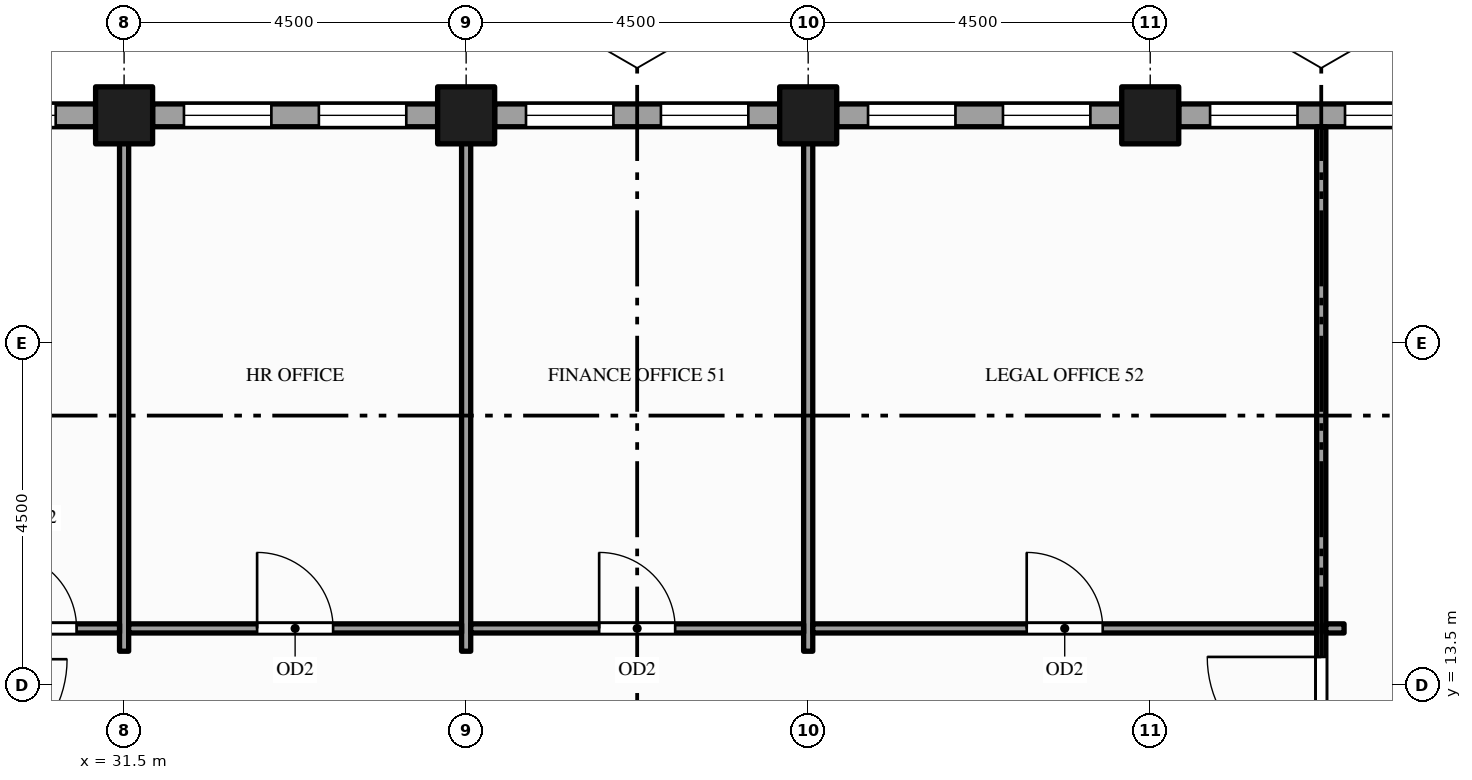
"""IFC4 building model, lengths in metres.
Left out: names, types, materials, properties, quantities, classifications, styles, units other than length and angle.
Written with IfcOpenShell. Run it as: python <this file> out.ifc"""

import sys

from ifc_helpers import new_model, si_unit, direction, frame, frame_2d, origin, origin_2d, place, context, subcontext, project, spatial, rectangle, hollow_rectangle, extrude, element, fill, save


model = new_model("IFC4")
c1 = context("Model", 3, precision=1e-05, world=origin(), true_north=direction((0.0, 1.0)))
c2 = subcontext(c1, "Body", "Model", "MODEL_VIEW")
j1 = project(units=[si_unit("LENGTHUNIT", "METRE"), si_unit("PLANEANGLEUNIT", "RADIAN")], contexts=[c1])
p1 = place(None, origin())
s1 = spatial("IfcSite", under=j1, at=p1, CompositionType="ELEMENT")
p2 = place(p1, origin())
s2 = spatial("IfcBuilding", under=s1, at=p2, CompositionType="ELEMENT")
p3 = place(p2, frame((0.0, 0.0, 211.0)))
s3 = spatial("IfcBuildingStorey", under=s2, at=p3, CompositionType="ELEMENT", Elevation=211.0)
for number, where, z_axis, x_axis in (
    (1, (31.5, 21.0, -0.15), (0.0, 0.0, 1.0), (1.0, 0.0, 0.0)),
    (2, (36.0, 21.0, -0.15), (0.0, 0.0, 1.0), (1.0, 0.0, 0.0)),
    (3, (40.5, 21.0, -0.15), (0.0, 0.0, 1.0), (1.0, 0.0, 0.0)),
    (4, (45.0, 21.0, -0.15), (0.0, 0.0, 1.0), (1.0, 0.0, 0.0)),
):
    element("IfcColumn", number, at=place(p3, frame(where, z_axis=z_axis, x_axis=x_axis)), inside=s3, PredefinedType="COLUMN", context=c2, shape_type="SweptSolid", body=[
        extrude(hollow_rectangle(XDim=0.75, YDim=0.75, WallThickness=0.036, at=origin_2d()), origin(), (0.0, 0.0, 1.0), 4.0),
    ])
p4 = place(p3, frame((49.125, 21.0, 0.0), z_axis=(0.0, 0.0, 1.0), x_axis=(-1.0, 0.0, 0.0)))
e5 = element("IfcWall", 5, at=p4, inside=s3, PredefinedType="STANDARD", context=c2, shape_type="SweptSolid", body=[
    extrude(rectangle(XDim=3.75, YDim=0.3, at=frame_2d((1.875, 0.0))), origin(), (0.0, 0.0, 1.0), 2.87),
])
p5 = place(p4, frame((0.413, 0.0, 0.9)))
e6 = element("IfcOpeningElement", 6, at=p5, cuts=e5, PredefinedType="OPENING", context=c2, shape_type="SweptSolid", body=[
    extrude(rectangle(XDim=1.15, YDim=1.75, at=frame_2d((0.575, 0.875))), frame((0.0, 0.16, 0.0), z_axis=(0.0, -1.0, 0.0), x_axis=(1.0, 0.0, 0.0)), (0.0, 0.0, 1.0), 0.32),
])
p6 = place(p4, frame((2.188, 0.0, 0.9)))
e7 = element("IfcOpeningElement", 7, at=p6, cuts=e5, PredefinedType="OPENING", context=c2, shape_type="SweptSolid", body=[
    extrude(rectangle(XDim=1.15, YDim=1.75, at=frame_2d((0.575, 0.875))), frame((0.0, 0.16, 0.0), z_axis=(0.0, -1.0, 0.0), x_axis=(1.0, 0.0, 0.0)), (0.0, 0.0, 1.0), 0.32),
])
p7 = place(p3, frame((44.625, 21.0, 0.0), z_axis=(0.0, 0.0, 1.0), x_axis=(-1.0, 0.0, 0.0)))
e8 = element("IfcWall", 8, at=p7, inside=s3, PredefinedType="STANDARD", context=c2, shape_type="SweptSolid", body=[
    extrude(rectangle(XDim=3.75, YDim=0.3, at=frame_2d((1.875, 0.0))), origin(), (0.0, 0.0, 1.0), 2.87),
])
p8 = place(p7, frame((0.413, 0.0, 0.9)))
e9 = element("IfcOpeningElement", 9, at=p8, cuts=e8, PredefinedType="OPENING", context=c2, shape_type="SweptSolid", body=[
    extrude(rectangle(XDim=1.15, YDim=1.75, at=frame_2d((0.575, 0.875))), frame((0.0, 0.16, 0.0), z_axis=(0.0, -1.0, 0.0), x_axis=(1.0, 0.0, 0.0)), (0.0, 0.0, 1.0), 0.32),
])
p9 = place(p7, frame((2.188, 0.0, 0.9)))
e10 = element("IfcOpeningElement", 10, at=p9, cuts=e8, PredefinedType="OPENING", context=c2, shape_type="SweptSolid", body=[
    extrude(rectangle(XDim=1.15, YDim=1.75, at=frame_2d((0.575, 0.875))), frame((0.0, 0.16, 0.0), z_axis=(0.0, -1.0, 0.0), x_axis=(1.0, 0.0, 0.0)), (0.0, 0.0, 1.0), 0.32),
])
p10 = place(p3, frame((40.125, 21.0, 0.0), z_axis=(0.0, 0.0, 1.0), x_axis=(-1.0, 0.0, 0.0)))
e11 = element("IfcWall", 11, at=p10, inside=s3, PredefinedType="STANDARD", context=c2, shape_type="SweptSolid", body=[
    extrude(rectangle(XDim=3.75, YDim=0.3, at=frame_2d((1.875, 0.0))), origin(), (0.0, 0.0, 1.0), 2.87),
])
p11 = place(p10, frame((0.413, 0.0, 0.9)))
e12 = element("IfcOpeningElement", 12, at=p11, cuts=e11, PredefinedType="OPENING", context=c2, shape_type="SweptSolid", body=[
    extrude(rectangle(XDim=1.15, YDim=1.75, at=frame_2d((0.575, 0.875))), frame((0.0, 0.16, 0.0), z_axis=(0.0, -1.0, 0.0), x_axis=(1.0, 0.0, 0.0)), (0.0, 0.0, 1.0), 0.32),
])
p12 = place(p10, frame((2.188, 0.0, 0.9)))
e13 = element("IfcOpeningElement", 13, at=p12, cuts=e11, PredefinedType="OPENING", context=c2, shape_type="SweptSolid", body=[
    extrude(rectangle(XDim=1.15, YDim=1.75, at=frame_2d((0.575, 0.875))), frame((0.0, 0.16, 0.0), z_axis=(0.0, -1.0, 0.0), x_axis=(1.0, 0.0, 0.0)), (0.0, 0.0, 1.0), 0.32),
])
p13 = place(p3, frame((35.625, 21.0, 0.0), z_axis=(0.0, 0.0, 1.0), x_axis=(-1.0, 0.0, 0.0)))
e14 = element("IfcWall", 14, at=p13, inside=s3, PredefinedType="STANDARD", context=c2, shape_type="SweptSolid", body=[
    extrude(rectangle(XDim=3.75, YDim=0.3, at=frame_2d((1.875, 0.0))), origin(), (0.0, 0.0, 1.0), 2.87),
])
p14 = place(p13, frame((0.413, 0.0, 0.9)))
e15 = element("IfcOpeningElement", 15, at=p14, cuts=e14, PredefinedType="OPENING", context=c2, shape_type="SweptSolid", body=[
    extrude(rectangle(XDim=1.15, YDim=1.75, at=frame_2d((0.575, 0.875))), frame((0.0, 0.16, 0.0), z_axis=(0.0, -1.0, 0.0), x_axis=(1.0, 0.0, 0.0)), (0.0, 0.0, 1.0), 0.32),
])
p15 = place(p13, frame((2.188, 0.0, 0.9)))
e16 = element("IfcOpeningElement", 16, at=p15, cuts=e14, PredefinedType="OPENING", context=c2, shape_type="SweptSolid", body=[
    extrude(rectangle(XDim=1.15, YDim=1.75, at=frame_2d((0.575, 0.875))), frame((0.0, 0.16, 0.0), z_axis=(0.0, -1.0, 0.0), x_axis=(1.0, 0.0, 0.0)), (0.0, 0.0, 1.0), 0.32),
])
p16 = place(p3, frame((31.125, 21.0, 0.0), z_axis=(0.0, 0.0, 1.0), x_axis=(-1.0, 0.0, 0.0)))
e17 = element("IfcWall", 17, at=p16, inside=s3, PredefinedType="STANDARD", context=c2, shape_type="SweptSolid", body=[
    extrude(rectangle(XDim=2.25, YDim=0.3, at=frame_2d((1.125, 0.0))), origin(), (0.0, 0.0, 1.0), 2.87),
])
p17 = place(p16, frame((0.525, 0.0, 0.9)))
e18 = element("IfcOpeningElement", 18, at=p17, cuts=e17, PredefinedType="OPENING", context=c2, shape_type="SweptSolid", body=[
    extrude(rectangle(XDim=1.2, YDim=1.75, at=frame_2d((0.6, 0.875))), frame((0.0, 0.16, 0.0), z_axis=(0.0, -1.0, 0.0), x_axis=(1.0, 0.0, 0.0)), (0.0, 0.0, 1.0), 0.32),
])
for number, where, z_axis, x_axis in (
    (19, (31.5, 13.95, 0.0), (0.0, 0.0, 1.0), (0.0, 1.0, 0.0)),
    (20, (36.0, 13.95, 0.0), (0.0, 0.0, 1.0), (0.0, 1.0, 0.0)),
    (21, (40.5, 13.95, 0.0), (0.0, 0.0, 1.0), (0.0, 1.0, 0.0)),
):
    element("IfcWall", number, at=place(p3, frame(where, z_axis=z_axis, x_axis=x_axis)), inside=s3, PredefinedType="PARTITIONING", context=c2, shape_type="SweptSolid", body=[
        extrude(rectangle(XDim=6.9, YDim=0.12, at=frame_2d((3.45, 0.0))), origin(), (0.0, 0.0, 1.0), 2.87),
    ])
p18 = place(p3, frame((47.25, -1.35, 0.0), z_axis=(0.0, 0.0, 1.0), x_axis=(0.0, 1.0, 0.0)))
e22 = element("IfcWall", 22, at=p18, inside=s3, PredefinedType="PARTITIONING", context=c2, shape_type="SweptSolid", body=[
    extrude(rectangle(XDim=22.2, YDim=0.12, at=frame_2d((11.1, 0.0))), origin(), (0.0, 0.0, 1.0), 2.87),
])
p19 = place(p18, frame((6.975, 0.0, 0.0)))
e23 = element("IfcOpeningElement", 23, at=p19, cuts=e22, PredefinedType="OPENING", context=c2, shape_type="SweptSolid", body=[
    extrude(rectangle(XDim=1.5, YDim=2.1, at=frame_2d((0.75, 1.05))), frame((0.0, 0.07, 0.0), z_axis=(0.0, -1.0, 0.0), x_axis=(1.0, 0.0, 0.0)), (0.0, 0.0, 1.0), 0.14),
])
p20 = place(p18, frame((13.725, 0.0, 0.0)))
e24 = element("IfcOpeningElement", 24, at=p20, cuts=e22, PredefinedType="OPENING", context=c2, shape_type="SweptSolid", body=[
    extrude(rectangle(XDim=1.5, YDim=2.1, at=frame_2d((0.75, 1.05))), frame((0.0, 0.07, 0.0), z_axis=(0.0, -1.0, 0.0), x_axis=(1.0, 0.0, 0.0)), (0.0, 0.0, 1.0), 0.14),
])
p21 = place(p18, frame((9.29, 0.0, 0.0)))
e25 = element("IfcOpeningElement", 25, at=p21, cuts=e22, PredefinedType="OPENING", context=c2, shape_type="SweptSolid", body=[
    extrude(rectangle(XDim=0.9, YDim=2.1, at=frame_2d((0.45, 1.05))), frame((0.0, 0.07, 0.0), z_axis=(0.0, -1.0, 0.0), x_axis=(1.0, 0.0, 0.0)), (0.0, 0.0, 1.0), 0.14),
])
p22 = place(p18, frame((10.65, 0.0, 0.0)))
e26 = element("IfcOpeningElement", 26, at=p22, cuts=e22, PredefinedType="OPENING", context=c2, shape_type="SweptSolid", body=[
    extrude(rectangle(XDim=0.9, YDim=2.1, at=frame_2d((0.45, 1.05))), frame((0.0, 0.07, 0.0), z_axis=(0.0, -1.0, 0.0), x_axis=(1.0, 0.0, 0.0)), (0.0, 0.0, 1.0), 0.14),
])
p23 = place(p18, frame((12.01, 0.0, 0.0)))
e27 = element("IfcOpeningElement", 27, at=p23, cuts=e22, PredefinedType="OPENING", context=c2, shape_type="SweptSolid", body=[
    extrude(rectangle(XDim=1.0, YDim=2.1, at=frame_2d((0.5, 1.05))), frame((0.0, 0.07, 0.0), z_axis=(0.0, -1.0, 0.0), x_axis=(1.0, 0.0, 0.0)), (0.0, 0.0, 1.0), 0.14),
])
p24 = place(p3, frame((29.31, 14.25, 0.0), z_axis=(0.0, 0.0, 1.0), x_axis=(1.0, 0.0, 0.0)))
e28 = element("IfcWall", 28, at=p24, inside=s3, PredefinedType="PARTITIONING", context=c2, shape_type="SweptSolid", body=[
    extrude(rectangle(XDim=2.13, YDim=0.12, at=frame_2d((1.065, 0.0))), origin(), (0.0, 0.0, 1.0), 2.87),
])
p25 = place(p24, frame((0.565, 0.0, 0.0)))
e29 = element("IfcOpeningElement", 29, at=p25, cuts=e28, PredefinedType="OPENING", context=c2, shape_type="SweptSolid", body=[
    extrude(rectangle(XDim=1.0, YDim=2.1, at=frame_2d((0.5, 1.05))), frame((0.0, 0.07, 0.0), z_axis=(0.0, -1.0, 0.0), x_axis=(1.0, 0.0, 0.0)), (0.0, 0.0, 1.0), 0.14),
])
p26 = place(p3, frame((31.56, 14.25, 0.0), z_axis=(0.0, 0.0, 1.0), x_axis=(1.0, 0.0, 0.0)))
e30 = element("IfcWall", 30, at=p26, inside=s3, PredefinedType="PARTITIONING", context=c2, shape_type="SweptSolid", body=[
    extrude(rectangle(XDim=4.38, YDim=0.12, at=frame_2d((2.19, 0.0))), origin(), (0.0, 0.0, 1.0), 2.87),
])
p27 = place(p26, frame((1.69, 0.0, 0.0)))
e31 = element("IfcOpeningElement", 31, at=p27, cuts=e30, PredefinedType="OPENING", context=c2, shape_type="SweptSolid", body=[
    extrude(rectangle(XDim=1.0, YDim=2.1, at=frame_2d((0.5, 1.05))), frame((0.0, 0.07, 0.0), z_axis=(0.0, -1.0, 0.0), x_axis=(1.0, 0.0, 0.0)), (0.0, 0.0, 1.0), 0.14),
])
p28 = place(p3, frame((36.06, 14.25, 0.0), z_axis=(0.0, 0.0, 1.0), x_axis=(1.0, 0.0, 0.0)))
e32 = element("IfcWall", 32, at=p28, inside=s3, PredefinedType="PARTITIONING", context=c2, shape_type="SweptSolid", body=[
    extrude(rectangle(XDim=4.38, YDim=0.12, at=frame_2d((2.19, 0.0))), origin(), (0.0, 0.0, 1.0), 2.87),
])
p29 = place(p28, frame((1.69, 0.0, 0.0)))
e33 = element("IfcOpeningElement", 33, at=p29, cuts=e32, PredefinedType="OPENING", context=c2, shape_type="SweptSolid", body=[
    extrude(rectangle(XDim=1.0, YDim=2.1, at=frame_2d((0.5, 1.05))), frame((0.0, 0.07, 0.0), z_axis=(0.0, -1.0, 0.0), x_axis=(1.0, 0.0, 0.0)), (0.0, 0.0, 1.0), 0.14),
])
p30 = place(p3, frame((40.56, 14.25, 0.0), z_axis=(0.0, 0.0, 1.0), x_axis=(1.0, 0.0, 0.0)))
e34 = element("IfcWall", 34, at=p30, inside=s3, PredefinedType="PARTITIONING", context=c2, shape_type="SweptSolid", body=[
    extrude(rectangle(XDim=6.63, YDim=0.12, at=frame_2d((3.315, 0.0))), origin(), (0.0, 0.0, 1.0), 2.87),
])
p31 = place(p30, frame((2.815, 0.0, 0.0)))
e35 = element("IfcOpeningElement", 35, at=p31, cuts=e34, PredefinedType="OPENING", context=c2, shape_type="SweptSolid", body=[
    extrude(rectangle(XDim=1.0, YDim=2.1, at=frame_2d((0.5, 1.05))), frame((0.0, 0.07, 0.0), z_axis=(0.0, -1.0, 0.0), x_axis=(1.0, 0.0, 0.0)), (0.0, 0.0, 1.0), 0.14),
])
p32 = place(p3, frame((47.31, 14.25, 0.0), z_axis=(0.0, 0.0, 1.0), x_axis=(1.0, 0.0, 0.0)))
e36 = element("IfcWall", 36, at=p32, inside=s3, PredefinedType="PARTITIONING", context=c2, shape_type="SweptSolid", body=[
    extrude(rectangle(XDim=0.24, YDim=0.12, at=frame_2d((0.12, 0.0))), origin(), (0.0, 0.0, 1.0), 2.87),
])
p33 = place(p5, origin())
e37 = element("IfcWindow", 37, at=p33, inside=s3, PartitioningType="SINGLE_PANEL", PredefinedType="WINDOW", context=c2, shape_type="SweptSolid", body=[
    extrude(rectangle(XDim=1.15, YDim=1.75, at=frame_2d((0.575, 0.875))), frame((0.0, 0.03, 0.0), z_axis=(0.0, -1.0, 0.0), x_axis=(1.0, 0.0, 0.0)), (0.0, 0.0, 1.0), 0.06),
])
fill(e6, e37)
p34 = place(p6, origin())
e38 = element("IfcWindow", 38, at=p34, inside=s3, PartitioningType="SINGLE_PANEL", PredefinedType="WINDOW", context=c2, shape_type="SweptSolid", body=[
    extrude(rectangle(XDim=1.15, YDim=1.75, at=frame_2d((0.575, 0.875))), frame((0.0, 0.03, 0.0), z_axis=(0.0, -1.0, 0.0), x_axis=(1.0, 0.0, 0.0)), (0.0, 0.0, 1.0), 0.06),
])
fill(e7, e38)
p35 = place(p8, origin())
e39 = element("IfcWindow", 39, at=p35, inside=s3, PartitioningType="SINGLE_PANEL", PredefinedType="WINDOW", context=c2, shape_type="SweptSolid", body=[
    extrude(rectangle(XDim=1.15, YDim=1.75, at=frame_2d((0.575, 0.875))), frame((0.0, 0.03, 0.0), z_axis=(0.0, -1.0, 0.0), x_axis=(1.0, 0.0, 0.0)), (0.0, 0.0, 1.0), 0.06),
])
fill(e9, e39)
p36 = place(p9, origin())
e40 = element("IfcWindow", 40, at=p36, inside=s3, PartitioningType="SINGLE_PANEL", PredefinedType="WINDOW", context=c2, shape_type="SweptSolid", body=[
    extrude(rectangle(XDim=1.15, YDim=1.75, at=frame_2d((0.575, 0.875))), frame((0.0, 0.03, 0.0), z_axis=(0.0, -1.0, 0.0), x_axis=(1.0, 0.0, 0.0)), (0.0, 0.0, 1.0), 0.06),
])
fill(e10, e40)
p37 = place(p11, origin())
e41 = element("IfcWindow", 41, at=p37, inside=s3, PartitioningType="SINGLE_PANEL", PredefinedType="WINDOW", context=c2, shape_type="SweptSolid", body=[
    extrude(rectangle(XDim=1.15, YDim=1.75, at=frame_2d((0.575, 0.875))), frame((0.0, 0.03, 0.0), z_axis=(0.0, -1.0, 0.0), x_axis=(1.0, 0.0, 0.0)), (0.0, 0.0, 1.0), 0.06),
])
fill(e12, e41)
p38 = place(p12, origin())
e42 = element("IfcWindow", 42, at=p38, inside=s3, PartitioningType="SINGLE_PANEL", PredefinedType="WINDOW", context=c2, shape_type="SweptSolid", body=[
    extrude(rectangle(XDim=1.15, YDim=1.75, at=frame_2d((0.575, 0.875))), frame((0.0, 0.03, 0.0), z_axis=(0.0, -1.0, 0.0), x_axis=(1.0, 0.0, 0.0)), (0.0, 0.0, 1.0), 0.06),
])
fill(e13, e42)
p39 = place(p14, origin())
e43 = element("IfcWindow", 43, at=p39, inside=s3, PartitioningType="SINGLE_PANEL", PredefinedType="WINDOW", context=c2, shape_type="SweptSolid", body=[
    extrude(rectangle(XDim=1.15, YDim=1.75, at=frame_2d((0.575, 0.875))), frame((0.0, 0.03, 0.0), z_axis=(0.0, -1.0, 0.0), x_axis=(1.0, 0.0, 0.0)), (0.0, 0.0, 1.0), 0.06),
])
fill(e15, e43)
p40 = place(p15, origin())
e44 = element("IfcWindow", 44, at=p40, inside=s3, PartitioningType="SINGLE_PANEL", PredefinedType="WINDOW", context=c2, shape_type="SweptSolid", body=[
    extrude(rectangle(XDim=1.15, YDim=1.75, at=frame_2d((0.575, 0.875))), frame((0.0, 0.03, 0.0), z_axis=(0.0, -1.0, 0.0), x_axis=(1.0, 0.0, 0.0)), (0.0, 0.0, 1.0), 0.06),
])
fill(e16, e44)
p41 = place(p17, origin())
e45 = element("IfcWindow", 45, at=p41, inside=s3, PartitioningType="SINGLE_PANEL", PredefinedType="WINDOW", context=c2, shape_type="SweptSolid", body=[
    extrude(rectangle(XDim=1.2, YDim=1.75, at=frame_2d((0.6, 0.875))), frame((0.0, 0.03, 0.0), z_axis=(0.0, -1.0, 0.0), x_axis=(1.0, 0.0, 0.0)), (0.0, 0.0, 1.0), 0.06),
])
fill(e18, e45)
p42 = place(p20, origin())
e46 = element("IfcDoor", 46, at=p42, inside=s3, OperationType="SINGLE_SWING_RIGHT", PredefinedType="DOOR", context=c2, shape_type="SweptSolid", body=[
    extrude(rectangle(XDim=1.5, YDim=2.1, at=frame_2d((0.75, 1.05))), frame((0.0, 0.025, 0.0), z_axis=(0.0, -1.0, 0.0), x_axis=(1.0, 0.0, 0.0)), (0.0, 0.0, 1.0), 0.05),
])
fill(e24, e46)
p43 = place(p25, origin())
e47 = element("IfcDoor", 47, at=p43, inside=s3, OperationType="SINGLE_SWING_LEFT", PredefinedType="DOOR", context=c2, shape_type="SweptSolid", body=[
    extrude(rectangle(XDim=1.0, YDim=2.1, at=frame_2d((0.5, 1.05))), frame((0.0, 0.025, 0.0), z_axis=(0.0, -1.0, 0.0), x_axis=(1.0, 0.0, 0.0)), (0.0, 0.0, 1.0), 0.05),
])
fill(e29, e47)
p44 = place(p27, origin())
e48 = element("IfcDoor", 48, at=p44, inside=s3, OperationType="SINGLE_SWING_LEFT", PredefinedType="DOOR", context=c2, shape_type="SweptSolid", body=[
    extrude(rectangle(XDim=1.0, YDim=2.1, at=frame_2d((0.5, 1.05))), frame((0.0, 0.025, 0.0), z_axis=(0.0, -1.0, 0.0), x_axis=(1.0, 0.0, 0.0)), (0.0, 0.0, 1.0), 0.05),
])
fill(e31, e48)
p45 = place(p29, origin())
e49 = element("IfcDoor", 49, at=p45, inside=s3, OperationType="SINGLE_SWING_LEFT", PredefinedType="DOOR", context=c2, shape_type="SweptSolid", body=[
    extrude(rectangle(XDim=1.0, YDim=2.1, at=frame_2d((0.5, 1.05))), frame((0.0, 0.025, 0.0), z_axis=(0.0, -1.0, 0.0), x_axis=(1.0, 0.0, 0.0)), (0.0, 0.0, 1.0), 0.05),
])
fill(e33, e49)
p46 = place(p31, origin())
e50 = element("IfcDoor", 50, at=p46, inside=s3, OperationType="SINGLE_SWING_LEFT", PredefinedType="DOOR", context=c2, shape_type="SweptSolid", body=[
    extrude(rectangle(XDim=1.0, YDim=2.1, at=frame_2d((0.5, 1.05))), frame((0.0, 0.025, 0.0), z_axis=(0.0, -1.0, 0.0), x_axis=(1.0, 0.0, 0.0)), (0.0, 0.0, 1.0), 0.05),
])
fill(e35, e50)
save(model, sys.argv[1])
